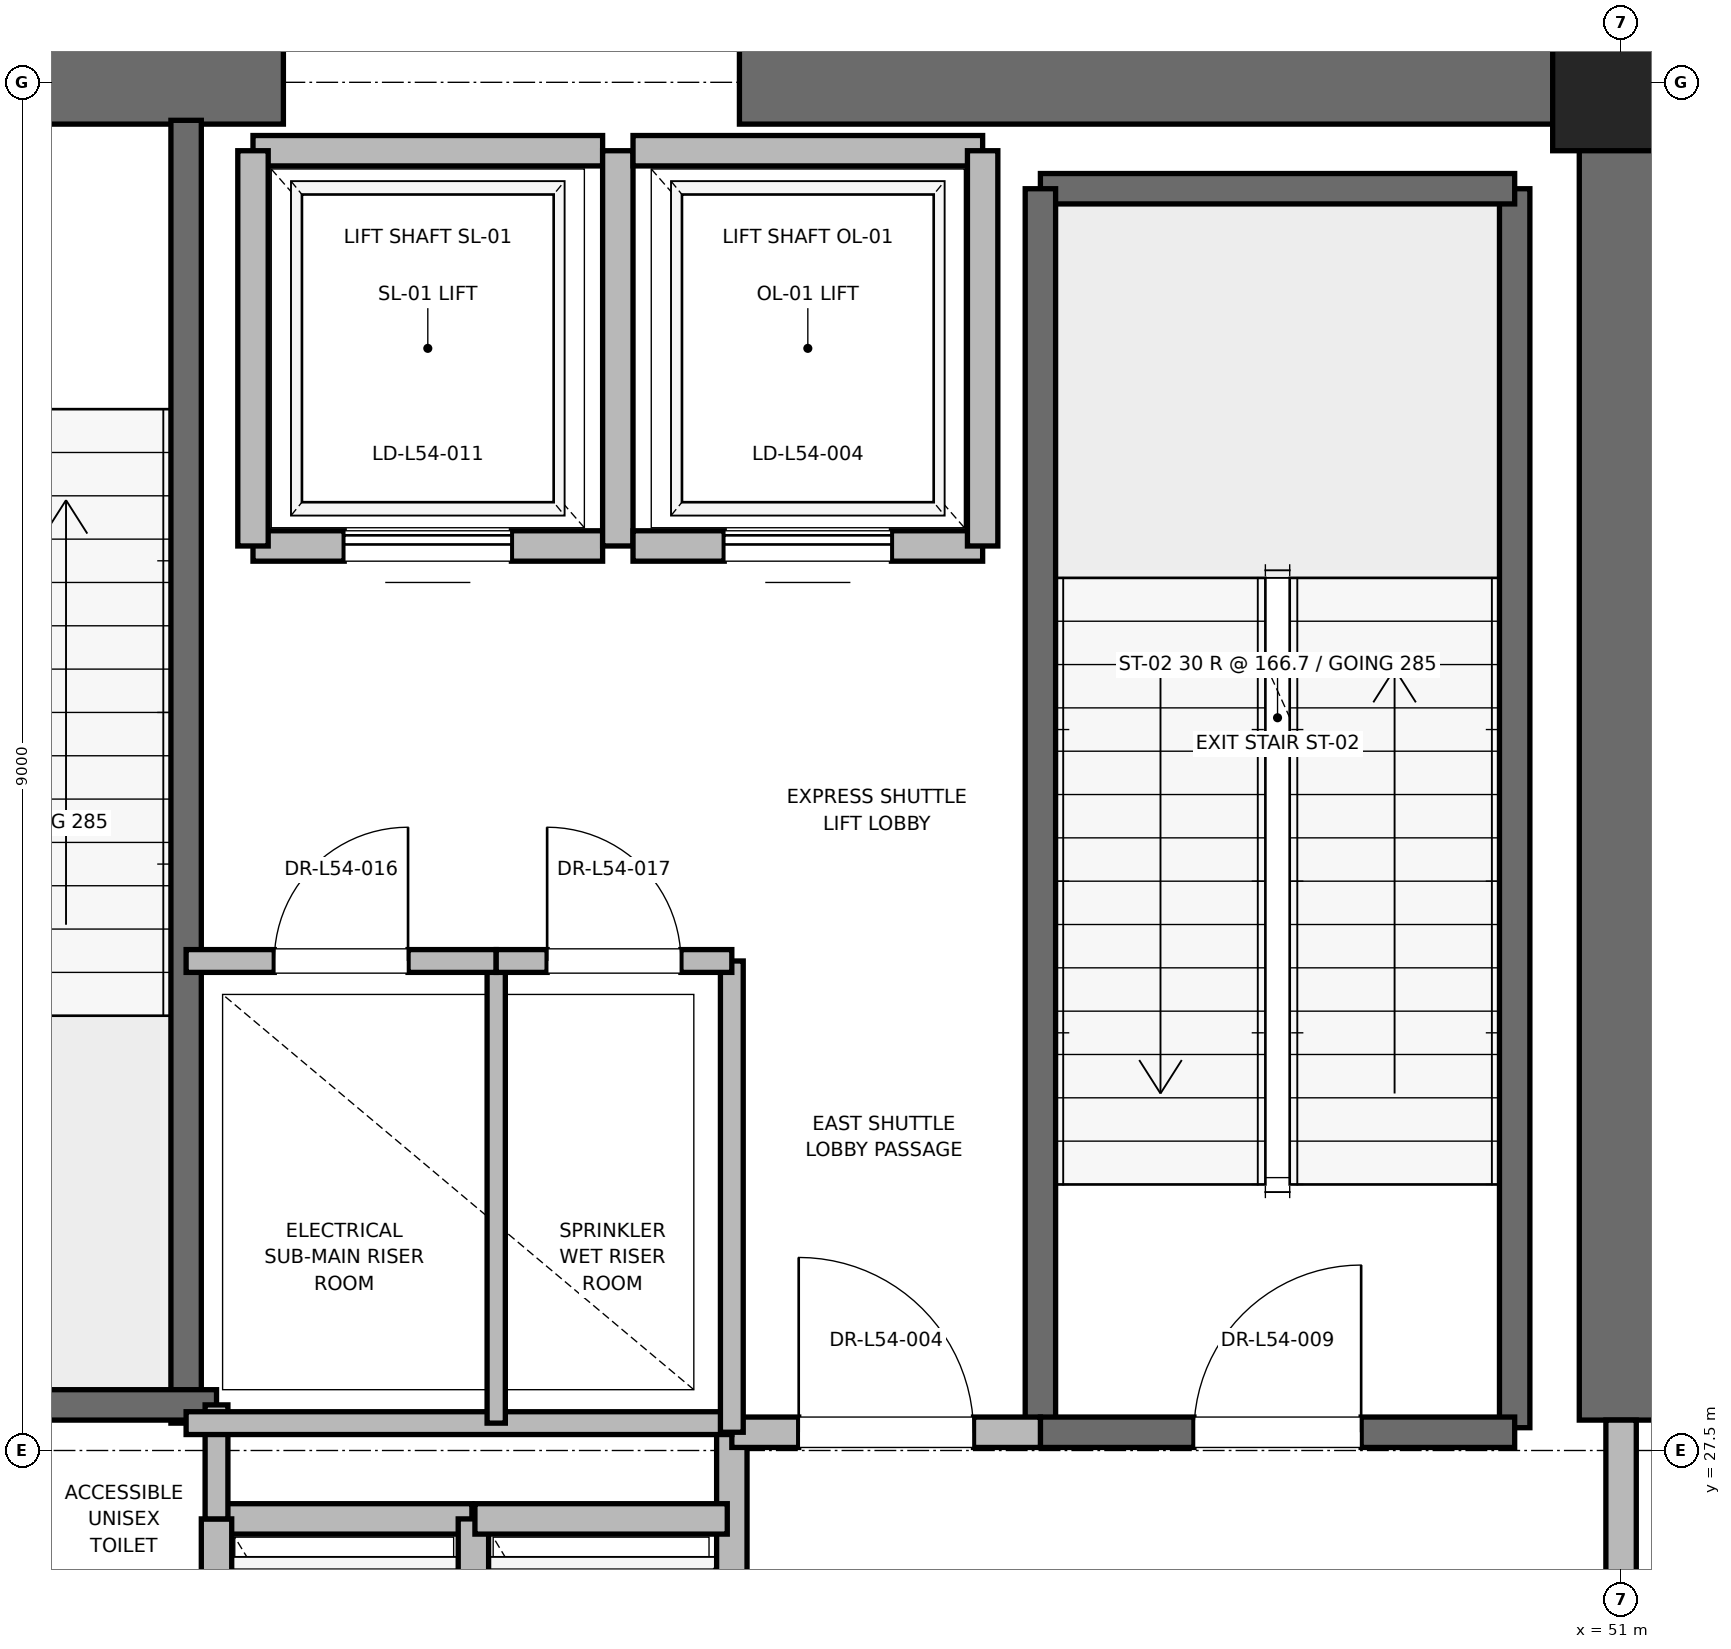
"""IFC4 building model, lengths in metres.
Left out: names, types, materials, properties, quantities, classifications, styles, units other than length and angle.
Written with IfcOpenShell. Run it as: python <this file> out.ifc"""

import sys

from ifc_helpers import new_model, si_unit, direction, frame, frame_2d, origin, origin_2d, place, context, subcontext, project, spatial, rectangle, extrude, element, fill, save


model = new_model("IFC4")
c1 = context("Model", 3, precision=1e-05, world=origin(), true_north=direction((0.0, 1.0)))
c2 = subcontext(c1, "Body", "Model", "MODEL_VIEW")
j1 = project(units=[si_unit("LENGTHUNIT", "METRE"), si_unit("PLANEANGLEUNIT", "RADIAN")], contexts=[c1])
p1 = place(None, origin())
s1 = spatial("IfcSite", under=j1, at=p1, CompositionType="ELEMENT")
p2 = place(p1, origin())
s2 = spatial("IfcBuilding", under=s1, at=p2, CompositionType="ELEMENT")
p3 = place(p2, frame((0.0, 0.0, 233.2)))
s3 = spatial("IfcBuildingStorey", under=s2, at=p3, CompositionType="ELEMENT", Elevation=233.2)
p4 = place(p3, frame((51.0, 36.5, 0.0), z_axis=(0.0, 0.0, 1.0), x_axis=(1.0, 0.0, 0.0)))
e1 = element("IfcColumn", 1, at=p4, inside=s3, PredefinedType="PILASTER", context=c2, shape_type="SweptSolid", body=[
    extrude(rectangle(XDim=0.9, YDim=0.9, at=origin_2d()), origin(), (0.0, 0.0, 1.0), 5.0),
])
p5 = place(p3, frame((37.8, 36.5, 0.0), z_axis=(0.0, 0.0, 1.0), x_axis=(1.0, 0.0, 0.0)))
e2 = element("IfcWall", 2, at=p5, inside=s3, PredefinedType="SHEAR", context=c2, shape_type="SweptSolid", body=[
    extrude(rectangle(XDim=4.4, YDim=0.55, at=frame_2d((2.2, 0.0))), origin(), (0.0, 0.0, 1.0), 4.7),
])
p6 = place(p5, frame((1.65, 0.0, 0.0)))
e3 = element("IfcOpeningElement", 3, at=p6, cuts=e2, PredefinedType="OPENING", context=c2, shape_type="SweptSolid", body=[
    extrude(rectangle(XDim=1.1, YDim=2.15, at=frame_2d((0.55, 1.075))), frame((0.0, 0.275, 0.0), z_axis=(0.0, -1.0, 0.0), x_axis=(1.0, 0.0, 0.0)), (0.0, 0.0, 1.0), 0.55),
])
p7 = place(p3, frame((45.2, 36.5, 0.0), z_axis=(0.0, 0.0, 1.0), x_axis=(1.0, 0.0, 0.0)))
e4 = element("IfcWall", 4, at=p7, inside=s3, PredefinedType="SHEAR", context=c2, shape_type="SweptSolid", body=[
    extrude(rectangle(XDim=5.8, YDim=0.55, at=frame_2d((2.9, 0.0))), origin(), (0.0, 0.0, 1.0), 4.7),
])
p8 = place(p3, frame((51.0, 27.7, 0.0), z_axis=(0.0, 0.0, 1.0), x_axis=(0.0, 1.0, 0.0)))
e5 = element("IfcWall", 5, at=p8, inside=s3, PredefinedType="SHEAR", context=c2, shape_type="SweptSolid", body=[
    extrude(rectangle(XDim=8.8, YDim=0.55, at=frame_2d((4.4, 0.0))), origin(), (0.0, 0.0, 1.0), 4.7),
])
p9 = place(p3, frame((50.3, 27.65, 0.0), z_axis=(0.0, 0.0, 1.0), x_axis=(0.0, 1.0, 0.0)))
e6 = element("IfcWall", 6, at=p9, inside=s3, PredefinedType="SOLIDWALL", context=c2, shape_type="SweptSolid", body=[
    extrude(rectangle(XDim=8.15, YDim=0.2, at=frame_2d((4.075, 0.0))), origin(), (0.0, 0.0, 1.0), 4.7),
])
p10 = place(p3, frame((47.18, 35.8, 0.0), z_axis=(0.0, 0.0, 1.0), x_axis=(1.0, 0.0, 0.0)))
e7 = element("IfcWall", 7, at=p10, inside=s3, PredefinedType="SOLIDWALL", context=c2, shape_type="SweptSolid", body=[
    extrude(rectangle(XDim=3.12, YDim=0.2, at=frame_2d((1.56, 0.0))), origin(), (0.0, 0.0, 1.0), 4.7),
])
p11 = place(p3, frame((47.18, 27.62, 0.0), z_axis=(0.0, 0.0, 1.0), x_axis=(0.0, 1.0, 0.0)))
e8 = element("IfcWall", 8, at=p11, inside=s3, PredefinedType="SOLIDWALL", context=c2, shape_type="SweptSolid", body=[
    extrude(rectangle(XDim=8.18, YDim=0.2, at=frame_2d((4.09, 0.0))), origin(), (0.0, 0.0, 1.0), 4.7),
])
p12 = place(p3, frame((47.18, 27.62, 0.0), z_axis=(0.0, 0.0, 1.0), x_axis=(1.0, 0.0, 0.0)))
e9 = element("IfcWall", 9, at=p12, inside=s3, PredefinedType="SOLIDWALL", context=c2, shape_type="SweptSolid", body=[
    extrude(rectangle(XDim=3.12, YDim=0.2, at=frame_2d((1.56, 0.0))), origin(), (0.0, 0.0, 1.0), 4.7),
])
p13 = place(p12, frame((1.01, 0.0, 0.0)))
e10 = element("IfcOpeningElement", 10, at=p13, cuts=e9, PredefinedType="OPENING", context=c2, shape_type="SweptSolid", body=[
    extrude(rectangle(XDim=1.1, YDim=2.15, at=frame_2d((0.55, 1.075))), frame((0.0, 0.1, 0.0), z_axis=(0.0, -1.0, 0.0), x_axis=(1.0, 0.0, 0.0)), (0.0, 0.0, 1.0), 0.2),
])
p14 = place(p3, frame((41.56, 27.68, 0.0), z_axis=(0.0, 0.0, 1.0), x_axis=(0.0, 1.0, 0.0)))
e11 = element("IfcWall", 11, at=p14, inside=s3, PredefinedType="SOLIDWALL", context=c2, shape_type="SweptSolid", body=[
    extrude(rectangle(XDim=8.57, YDim=0.2, at=frame_2d((4.285, 0.0))), origin(), (0.0, 0.0, 1.0), 4.7),
])
p15 = place(p3, frame((38.44, 27.8, 0.0), z_axis=(0.0, 0.0, 1.0), x_axis=(1.0, 0.0, 0.0)))
e12 = element("IfcWall", 12, at=p15, inside=s3, PredefinedType="SOLIDWALL", context=c2, shape_type="SweptSolid", body=[
    extrude(rectangle(XDim=3.32, YDim=0.2, at=frame_2d((1.66, 0.0))), origin(), (0.0, 0.0, 1.0), 4.7),
])
p16 = place(p3, frame((45.15, 24.25, 0.0), z_axis=(0.0, 0.0, 1.0), x_axis=(0.0, 1.0, 0.0)))
e13 = element("IfcWall", 13, at=p16, inside=s3, PredefinedType="PARTITIONING", context=c2, shape_type="SweptSolid", body=[
    extrude(rectangle(XDim=3.37, YDim=0.2, at=frame_2d((1.685, 0.0))), origin(), (0.0, 0.0, 1.0), 4.7),
])
p17 = place(p3, frame((45.15, 27.62, 0.0), z_axis=(0.0, 0.0, 1.0), x_axis=(1.0, 0.0, 0.0)))
e14 = element("IfcWall", 14, at=p17, inside=s3, PredefinedType="PARTITIONING", context=c2, shape_type="SweptSolid", body=[
    extrude(rectangle(XDim=2.03, YDim=0.2, at=frame_2d((1.015, 0.0))), origin(), (0.0, 0.0, 1.0), 4.7),
])
p18 = place(p17, frame((0.44, 0.0, 0.0)))
e15 = element("IfcOpeningElement", 15, at=p18, cuts=e14, PredefinedType="OPENING", context=c2, shape_type="SweptSolid", body=[
    extrude(rectangle(XDim=1.15, YDim=2.2, at=frame_2d((0.575, 1.1))), frame((0.0, 0.1, 0.0), z_axis=(0.0, -1.0, 0.0), x_axis=(1.0, 0.0, 0.0)), (0.0, 0.0, 1.0), 0.2),
])
p19 = place(p3, frame((51.0, 24.3, 0.0), z_axis=(0.0, 0.0, 1.0), x_axis=(0.0, 1.0, 0.0)))
e16 = element("IfcWall", 16, at=p19, inside=s3, PredefinedType="PARTITIONING", context=c2, shape_type="SweptSolid", body=[
    extrude(rectangle(XDim=3.4, YDim=0.2, at=frame_2d((1.7, 0.0))), origin(), (0.0, 0.0, 1.0), 3.68),
])
p20 = place(p19, frame((1.125, 0.0, 0.0)))
e17 = element("IfcOpeningElement", 17, at=p20, cuts=e16, PredefinedType="OPENING", context=c2, shape_type="SweptSolid", body=[
    extrude(rectangle(XDim=1.15, YDim=2.2, at=frame_2d((0.575, 1.1))), frame((0.0, 0.1, 0.0), z_axis=(0.0, -1.0, 0.0), x_axis=(1.0, 0.0, 0.0)), (0.0, 0.0, 1.0), 0.2),
])
p21 = place(p3, frame((43.44, 27.05, 0.0), z_axis=(0.0, 0.0, 1.0), x_axis=(-1.0, 0.0, 0.0)))
e18 = element("IfcWall", 18, at=p21, inside=s3, PredefinedType="SOLIDWALL", context=c2, shape_type="SweptSolid", body=[
    extrude(rectangle(XDim=1.68, YDim=0.2, at=frame_2d((0.84, 0.0))), origin(), (0.0, 0.0, 1.0), 4.7),
])
for number, where, z_axis, x_axis in (
    (19, (41.76, 27.05, 0.0), (0.0, 0.0, 1.0), (0.0, -1.0, 0.0)),
    (20, (43.45, 24.45, 0.0), (0.0, 0.0, 1.0), (0.0, 1.0, 0.0)),
):
    element("IfcWall", number, at=place(p3, frame(where, z_axis=z_axis, x_axis=x_axis)), inside=s3, PredefinedType="SOLIDWALL", context=c2, shape_type="SweptSolid", body=[
        extrude(rectangle(XDim=2.6, YDim=0.2, at=frame_2d((1.3, 0.0))), origin(), (0.0, 0.0, 1.0), 4.7),
    ])
p22 = place(p3, frame((45.12, 27.05, 0.0), z_axis=(0.0, 0.0, 1.0), x_axis=(-1.0, 0.0, 0.0)))
e21 = element("IfcWall", 21, at=p22, inside=s3, PredefinedType="SOLIDWALL", context=c2, shape_type="SweptSolid", body=[
    extrude(rectangle(XDim=1.66, YDim=0.2, at=frame_2d((0.83, 0.0))), origin(), (0.0, 0.0, 1.0), 4.7),
])
p23 = place(p3, frame((42.0, 33.45, 0.0), z_axis=(0.0, 0.0, 1.0), x_axis=(1.0, 0.0, 0.0)))
e22 = element("IfcWall", 22, at=p23, inside=s3, PredefinedType="SOLIDWALL", context=c2, shape_type="SweptSolid", body=[
    extrude(rectangle(XDim=2.3, YDim=0.2, at=frame_2d((1.15, 0.0))), origin(), (0.0, 0.0, 1.0), 4.7),
])
p24 = place(p23, frame((0.6, 0.0, 0.0)))
e23 = element("IfcOpeningElement", 23, at=p24, cuts=e22, PredefinedType="OPENING", context=c2, shape_type="SweptSolid", body=[
    extrude(rectangle(XDim=1.1, YDim=2.2, at=frame_2d((0.55, 1.1))), frame((0.0, 0.1, 0.0), z_axis=(0.0, -1.0, 0.0), x_axis=(1.0, 0.0, 0.0)), (0.0, 0.0, 1.0), 0.2),
])
p25 = place(p3, frame((44.3, 36.05, 0.0), z_axis=(0.0, 0.0, 1.0), x_axis=(-1.0, 0.0, 0.0)))
e24 = element("IfcWall", 24, at=p25, inside=s3, PredefinedType="SOLIDWALL", context=c2, shape_type="SweptSolid", body=[
    extrude(rectangle(XDim=2.3, YDim=0.2, at=frame_2d((1.15, 0.0))), origin(), (0.0, 0.0, 1.0), 3.68),
])
for number, where, z_axis, x_axis in (
    (25, (42.0, 36.05, 0.0), (0.0, 0.0, 1.0), (0.0, -1.0, 0.0)),
    (26, (44.4, 33.45, 0.0), (0.0, 0.0, 1.0), (0.0, 1.0, 0.0)),
):
    element("IfcWall", number, at=place(p3, frame(where, z_axis=z_axis, x_axis=x_axis)), inside=s3, PredefinedType="SOLIDWALL", context=c2, shape_type="SweptSolid", body=[
        extrude(rectangle(XDim=2.6, YDim=0.2, at=frame_2d((1.3, 0.0))), origin(), (0.0, 0.0, 1.0), 3.68),
    ])
p26 = place(p3, frame((44.5, 33.45, 0.0), z_axis=(0.0, 0.0, 1.0), x_axis=(1.0, 0.0, 0.0)))
e27 = element("IfcWall", 27, at=p26, inside=s3, PredefinedType="SOLIDWALL", context=c2, shape_type="SweptSolid", body=[
    extrude(rectangle(XDim=2.3, YDim=0.2, at=frame_2d((1.15, 0.0))), origin(), (0.0, 0.0, 1.0), 4.7),
])
p27 = place(p26, frame((0.6, 0.0, 0.0)))
e28 = element("IfcOpeningElement", 28, at=p27, cuts=e27, PredefinedType="OPENING", context=c2, shape_type="SweptSolid", body=[
    extrude(rectangle(XDim=1.1, YDim=2.2, at=frame_2d((0.55, 1.1))), frame((0.0, 0.1, 0.0), z_axis=(0.0, -1.0, 0.0), x_axis=(1.0, 0.0, 0.0)), (0.0, 0.0, 1.0), 0.2),
])
p28 = place(p3, frame((46.8, 36.05, 0.0), z_axis=(0.0, 0.0, 1.0), x_axis=(-1.0, 0.0, 0.0)))
e29 = element("IfcWall", 29, at=p28, inside=s3, PredefinedType="SOLIDWALL", context=c2, shape_type="SweptSolid", body=[
    extrude(rectangle(XDim=2.3, YDim=0.2, at=frame_2d((1.15, 0.0))), origin(), (0.0, 0.0, 1.0), 3.68),
])
p29 = place(p3, frame((46.8, 33.45, 0.0), z_axis=(0.0, 0.0, 1.0), x_axis=(0.0, 1.0, 0.0)))
e30 = element("IfcWall", 30, at=p29, inside=s3, PredefinedType="SOLIDWALL", context=c2, shape_type="SweptSolid", body=[
    extrude(rectangle(XDim=2.6, YDim=0.2, at=frame_2d((1.3, 0.0))), origin(), (0.0, 0.0, 1.0), 4.7),
])
p30 = place(p3, frame((41.76, 27.05, 0.0), z_axis=(0.0, 0.0, 1.0), x_axis=(0.0, 1.0, 0.0)))
e31 = element("IfcWall", 31, at=p30, inside=s3, PredefinedType="PARTITIONING", context=c2, shape_type="SweptSolid", body=[
    extrude(rectangle(XDim=0.75, YDim=0.15, at=frame_2d((0.375, 0.0))), origin(), (0.0, 0.0, 1.0), 2.85),
])
p31 = place(p3, frame((41.56, 27.68, 0.0), z_axis=(0.0, 0.0, 1.0), x_axis=(1.0, 0.0, 0.0)))
e32 = element("IfcWall", 32, at=p31, inside=s3, PredefinedType="PARTITIONING", context=c2, shape_type="SweptSolid", body=[
    extrude(rectangle(XDim=3.59, YDim=0.15, at=frame_2d((1.795, 0.0))), origin(), (0.0, 0.0, 1.0), 2.85),
])
p32 = place(p3, frame((45.15, 27.62, 0.0), z_axis=(0.0, 0.0, 1.0), x_axis=(0.0, 1.0, 0.0)))
e33 = element("IfcWall", 33, at=p32, inside=s3, PredefinedType="PARTITIONING", context=c2, shape_type="SweptSolid", body=[
    extrude(rectangle(XDim=3.1, YDim=0.15, at=frame_2d((1.55, 0.0))), origin(), (0.0, 0.0, 1.0), 2.85),
])
p33 = place(p3, frame((43.6, 27.68, 0.0), z_axis=(0.0, 0.0, 1.0), x_axis=(0.0, 1.0, 0.0)))
e34 = element("IfcWall", 34, at=p33, inside=s3, PredefinedType="PARTITIONING", context=c2, shape_type="SweptSolid", body=[
    extrude(rectangle(XDim=3.04, YDim=0.12, at=frame_2d((1.52, 0.0))), origin(), (0.0, 0.0, 1.0), 2.85),
])
p34 = place(p3, frame((41.56, 30.72, 0.0), z_axis=(0.0, 0.0, 1.0), x_axis=(1.0, 0.0, 0.0)))
e35 = element("IfcWall", 35, at=p34, inside=s3, PredefinedType="PARTITIONING", context=c2, shape_type="SweptSolid", body=[
    extrude(rectangle(XDim=2.04, YDim=0.15, at=frame_2d((1.02, 0.0))), origin(), (0.0, 0.0, 1.0), 2.85),
])
p35 = place(p34, frame((0.58, 0.0, 0.0)))
e36 = element("IfcOpeningElement", 36, at=p35, cuts=e35, PredefinedType="OPENING", context=c2, shape_type="SweptSolid", body=[
    extrude(rectangle(XDim=0.88, YDim=2.1, at=frame_2d((0.44, 1.05))), frame((0.0, 0.075, 0.0), z_axis=(0.0, -1.0, 0.0), x_axis=(1.0, 0.0, 0.0)), (0.0, 0.0, 1.0), 0.15),
])
p36 = place(p3, frame((43.6, 30.72, 0.0), z_axis=(0.0, 0.0, 1.0), x_axis=(1.0, 0.0, 0.0)))
e37 = element("IfcWall", 37, at=p36, inside=s3, PredefinedType="PARTITIONING", context=c2, shape_type="SweptSolid", body=[
    extrude(rectangle(XDim=1.55, YDim=0.15, at=frame_2d((0.775, 0.0))), origin(), (0.0, 0.0, 1.0), 2.85),
])
p37 = place(p36, frame((0.335, 0.0, 0.0)))
e38 = element("IfcOpeningElement", 38, at=p37, cuts=e37, PredefinedType="OPENING", context=c2, shape_type="SweptSolid", body=[
    extrude(rectangle(XDim=0.88, YDim=2.1, at=frame_2d((0.44, 1.05))), frame((0.0, 0.075, 0.0), z_axis=(0.0, -1.0, 0.0), x_axis=(1.0, 0.0, 0.0)), (0.0, 0.0, 1.0), 0.15),
])
p38 = place(p13, origin())
e39 = element("IfcDoor", 39, at=p38, inside=s3, OperationType="SINGLE_SWING_RIGHT", PredefinedType="DOOR", context=c2, shape_type="SweptSolid", body=[
    extrude(rectangle(XDim=1.1, YDim=2.15, at=frame_2d((0.55, 1.075))), frame((0.0, 0.025, 0.0), z_axis=(0.0, -1.0, 0.0), x_axis=(1.0, 0.0, 0.0)), (0.0, 0.0, 1.0), 0.05),
])
fill(e10, e39)
p39 = place(p18, origin())
e40 = element("IfcDoor", 40, at=p39, inside=s3, OperationType="SINGLE_SWING_LEFT", PredefinedType="DOOR", context=c2, shape_type="SweptSolid", body=[
    extrude(rectangle(XDim=1.15, YDim=2.2, at=frame_2d((0.575, 1.1))), frame((0.0, 0.025, 0.0), z_axis=(0.0, -1.0, 0.0), x_axis=(1.0, 0.0, 0.0)), (0.0, 0.0, 1.0), 0.05),
])
fill(e15, e40)
p40 = place(p24, origin())
e41 = element("IfcDoor", 41, at=p40, inside=s3, OperationType="SLIDING_TO_RIGHT", PredefinedType="DOOR", context=c2, shape_type="SweptSolid", body=[
    extrude(rectangle(XDim=1.1, YDim=2.2, at=frame_2d((0.55, 1.1))), frame((0.0, 0.025, 0.0), z_axis=(0.0, -1.0, 0.0), x_axis=(1.0, 0.0, 0.0)), (0.0, 0.0, 1.0), 0.05),
])
fill(e23, e41)
p41 = place(p27, origin())
e42 = element("IfcDoor", 42, at=p41, inside=s3, OperationType="SLIDING_TO_RIGHT", PredefinedType="DOOR", context=c2, shape_type="SweptSolid", body=[
    extrude(rectangle(XDim=1.1, YDim=2.2, at=frame_2d((0.55, 1.1))), frame((0.0, 0.025, 0.0), z_axis=(0.0, -1.0, 0.0), x_axis=(1.0, 0.0, 0.0)), (0.0, 0.0, 1.0), 0.05),
])
fill(e28, e42)
p42 = place(p35, origin())
e43 = element("IfcDoor", 43, at=p42, inside=s3, OperationType="SINGLE_SWING_RIGHT", PredefinedType="DOOR", context=c2, shape_type="SweptSolid", body=[
    extrude(rectangle(XDim=0.88, YDim=2.1, at=frame_2d((0.44, 1.05))), frame((0.0, 0.025, 0.0), z_axis=(0.0, -1.0, 0.0), x_axis=(1.0, 0.0, 0.0)), (0.0, 0.0, 1.0), 0.05),
])
fill(e36, e43)
p43 = place(p37, origin())
e44 = element("IfcDoor", 44, at=p43, inside=s3, OperationType="SINGLE_SWING_LEFT", PredefinedType="DOOR", context=c2, shape_type="SweptSolid", body=[
    extrude(rectangle(XDim=0.88, YDim=2.1, at=frame_2d((0.44, 1.05))), frame((0.0, 0.025, 0.0), z_axis=(0.0, -1.0, 0.0), x_axis=(1.0, 0.0, 0.0)), (0.0, 0.0, 1.0), 0.05),
])
fill(e38, e44)
save(model, sys.argv[1])
